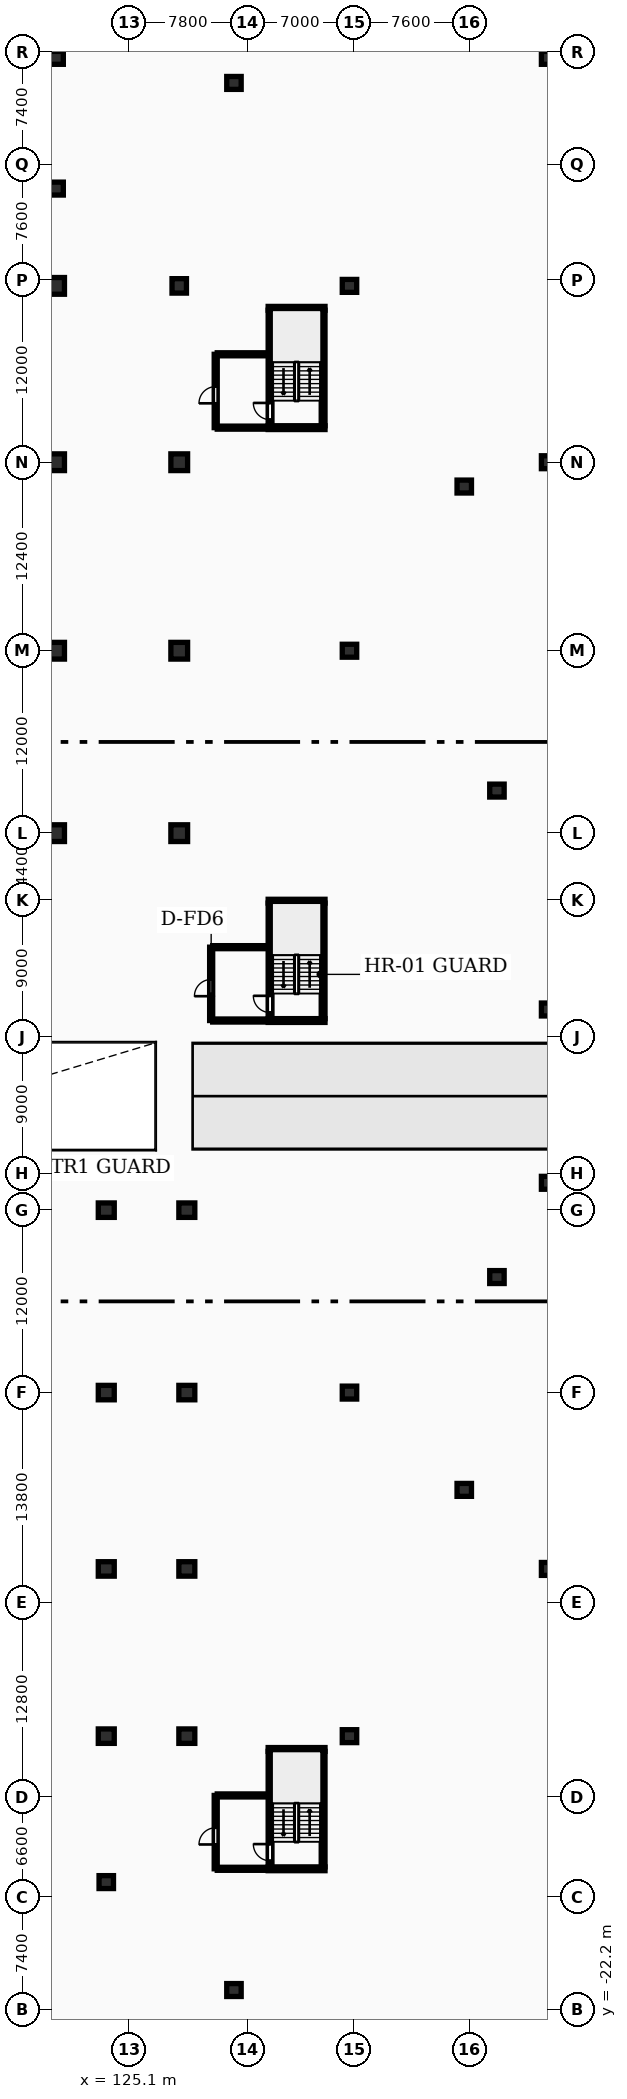
"""IFC4 building model, lengths in metres.
Left out: names, types, materials, properties, quantities, classifications, styles, units other than length and angle.
Written with IfcOpenShell. Run it as: python <this file> out.ifc"""

import sys

from ifc_helpers import new_model, si_unit, direction, frame, frame_2d, origin, origin_2d, place, context, subcontext, project, spatial, rectangle, circle, extrude, element, fill, save


model = new_model("IFC4")
c1 = context("Model", 3, precision=1e-05, world=origin(), true_north=direction((0.0, 1.0)))
c2 = subcontext(c1, "Body", "Model", "MODEL_VIEW")
j1 = project(units=[si_unit("LENGTHUNIT", "METRE"), si_unit("PLANEANGLEUNIT", "RADIAN")], contexts=[c1])
p1 = place(None, origin())
s1 = spatial("IfcSite", under=j1, at=p1, CompositionType="ELEMENT")
p2 = place(p1, origin())
s2 = spatial("IfcBuilding", under=s1, at=p2, CompositionType="ELEMENT")
p3 = place(p2, frame((0.0, 0.0, -3.6)))
s3 = spatial("IfcBuildingStorey", under=s2, at=p3, CompositionType="ELEMENT", Elevation=-3.6)
for number, where, z_axis, x_axis in (
    (1, (120.3, 55.2, 0.0), (0.0, 0.0, 1.0), (1.0, 0.0, 0.0)),
    (2, (120.3, 67.2, 0.0), (0.0, 0.0, 1.0), (1.0, 0.0, 0.0)),
    (3, (120.3, 79.6, 0.0), (0.0, 0.0, 1.0), (1.0, 0.0, 0.0)),
    (4, (120.3, 91.2, 0.0), (0.0, 0.0, 1.0), (1.0, 0.0, 0.0)),
    (5, (128.4, 55.2, 0.0), (0.0, 0.0, 1.0), (1.0, 0.0, 0.0)),
    (6, (128.4, 67.2, 0.0), (0.0, 0.0, 1.0), (1.0, 0.0, 0.0)),
    (7, (128.4, 79.6, 0.0), (0.0, 0.0, 1.0), (1.0, 0.0, 0.0)),
):
    element("IfcColumn", number, at=place(p3, frame(where, z_axis=z_axis, x_axis=x_axis)), inside=s3, PredefinedType="COLUMN", context=c2, shape_type="SweptSolid", body=[
        extrude(rectangle(XDim=1.1, YDim=1.1, at=origin_2d()), origin(), (0.0, 0.0, 1.0), 3.6),
    ])
p4 = place(p3, frame((128.4, 91.2, 0.0), z_axis=(0.0, 0.0, 1.0), x_axis=(1.0, 0.0, 0.0)))
e8 = element("IfcColumn", 8, at=p4, inside=s3, PredefinedType="COLUMN", context=c2, shape_type="SweptSolid", body=[
    extrude(circle(Radius=0.475, at=origin_2d()), origin(), (0.0, 0.0, 1.0), 3.6),
])
for number, where, z_axis, x_axis in (
    (9, (123.6, -4.2, 0.0), (0.0, 0.0, 1.0), (1.0, 0.0, 0.0)),
    (10, (123.6, 6.8, 0.0), (0.0, 0.0, 1.0), (1.0, 0.0, 0.0)),
    (11, (123.6, 18.4, 0.0), (0.0, 0.0, 1.0), (1.0, 0.0, 0.0)),
    (12, (123.6, 30.4, 0.0), (0.0, 0.0, 1.0), (1.0, 0.0, 0.0)),
    (13, (128.9, -4.2, 0.0), (0.0, 0.0, 1.0), (1.0, 0.0, 0.0)),
    (14, (128.9, 6.8, 0.0), (0.0, 0.0, 1.0), (1.0, 0.0, 0.0)),
    (15, (128.9, 18.4, 0.0), (0.0, 0.0, 1.0), (1.0, 0.0, 0.0)),
    (16, (128.9, 30.4, 0.0), (0.0, 0.0, 1.0), (1.0, 0.0, 0.0)),
):
    element("IfcColumn", number, at=place(p3, frame(where, z_axis=z_axis, x_axis=x_axis)), inside=s3, PredefinedType="COLUMN", context=c2, shape_type="SweptSolid", body=[
        extrude(rectangle(XDim=1.05, YDim=0.95, at=origin_2d()), origin(), (0.0, 0.0, 1.0), 3.6),
    ])
for number, where, z_axis, x_axis in (
    (17, (139.6, -4.2, 0.0), (0.0, 0.0, 1.0), (1.0, 0.0, 0.0)),
    (18, (139.6, 18.4, 0.0), (0.0, 0.0, 1.0), (1.0, 0.0, 0.0)),
    (19, (139.6, 67.2, 0.0), (0.0, 0.0, 1.0), (1.0, 0.0, 0.0)),
    (20, (139.6, 91.2, 0.0), (0.0, 0.0, 1.0), (1.0, 0.0, 0.0)),
    (21, (123.6, -13.8, 0.0), (0.0, 0.0, 1.0), (1.0, 0.0, 0.0)),
    (22, (120.3, 97.6, 0.0), (0.0, 0.0, 1.0), (1.0, 0.0, 0.0)),
    (23, (132.0, -20.9, 0.0), (0.0, 0.0, 1.0), (1.0, 0.0, 0.0)),
    (24, (132.0, 104.55, 0.0), (0.0, 0.0, 1.0), (1.0, 0.0, 0.0)),
    (25, (149.3, 26.0, 0.0), (0.0, 0.0, 1.0), (1.0, 0.0, 0.0)),
    (26, (149.3, 58.0, 0.0), (0.0, 0.0, 1.0), (1.0, 0.0, 0.0)),
    (27, (147.15, 12.0, 0.0), (0.0, 0.0, 1.0), (1.0, 0.0, 0.0)),
    (28, (147.15, 78.0, 0.0), (0.0, 0.0, 1.0), (1.0, 0.0, 0.0)),
    (29, (152.7, 6.8, 0.0), (0.0, 0.0, 1.0), (1.0, 0.0, 0.0)),
    (30, (152.7, 32.2, 0.0), (0.0, 0.0, 1.0), (1.0, 0.0, 0.0)),
    (31, (152.7, 43.6, 0.0), (0.0, 0.0, 1.0), (1.0, 0.0, 0.0)),
    (32, (152.7, 79.6, 0.0), (0.0, 0.0, 1.0), (1.0, 0.0, 0.0)),
    (33, (152.7, 106.2, 0.0), (0.0, 0.0, 1.0), (1.0, 0.0, 0.0)),
    (34, (120.3, 106.2, 0.0), (0.0, 0.0, 1.0), (1.0, 0.0, 0.0)),
):
    element("IfcColumn", number, at=place(p3, frame(where, z_axis=z_axis, x_axis=x_axis)), inside=s3, PredefinedType="COLUMN", context=c2, shape_type="SweptSolid", body=[
        extrude(rectangle(XDim=0.95, YDim=0.85, at=origin_2d()), origin(), (0.0, 0.0, 1.0), 3.6),
    ])
p5 = place(p3, frame((134.375, 43.0, 0.0), z_axis=(0.0, 0.0, 1.0), x_axis=(0.0, 1.0, 0.0)))
e35 = element("IfcWall", 35, at=p5, inside=s3, PredefinedType="SHEAR", context=c2, shape_type="SweptSolid", body=[
    extrude(rectangle(XDim=7.6, YDim=0.25, at=frame_2d((3.8, 0.0))), origin(), (0.0, 0.0, 1.0), 3.6),
])
p6 = place(p5, frame((0.4, 0.0, 0.0)))
e36 = element("IfcOpeningElement", 36, at=p6, cuts=e35, PredefinedType="OPENING", context=c2, shape_type="SweptSolid", body=[
    extrude(rectangle(XDim=1.1, YDim=2.1, at=frame_2d((0.55, 1.05))), frame((0.0, 0.135, 0.0), z_axis=(0.0, -1.0, 0.0), x_axis=(1.0, 0.0, 0.0)), (0.0, 0.0, 1.0), 0.27),
])
p7 = place(p3, frame((137.865, 43.0, 0.0), z_axis=(0.0, 0.0, 1.0), x_axis=(0.0, 1.0, 0.0)))
e37 = element("IfcWall", 37, at=p7, inside=s3, PredefinedType="SHEAR", context=c2, shape_type="SweptSolid", body=[
    extrude(rectangle(XDim=7.6, YDim=0.25, at=frame_2d((3.8, 0.0))), origin(), (0.0, 0.0, 1.0), 3.6),
])
for number, where, z_axis, x_axis in (
    (38, (134.25, 42.875, 0.0), (0.0, 0.0, 1.0), (1.0, 0.0, 0.0)),
    (39, (134.25, 50.725, 0.0), (0.0, 0.0, 1.0), (1.0, 0.0, 0.0)),
):
    element("IfcWall", number, at=place(p3, frame(where, z_axis=z_axis, x_axis=x_axis)), inside=s3, PredefinedType="SHEAR", context=c2, shape_type="SweptSolid", body=[
        extrude(rectangle(XDim=3.74, YDim=0.25, at=frame_2d((1.87, 0.0))), origin(), (0.0, 0.0, 1.0), 3.6),
    ])
p8 = place(p3, frame((130.5, 42.875, 0.0), z_axis=(0.0, 0.0, 1.0), x_axis=(0.0, 1.0, 0.0)))
e40 = element("IfcWall", 40, at=p8, inside=s3, PredefinedType="PARTITIONING", context=c2, shape_type="SweptSolid", body=[
    extrude(rectangle(XDim=4.825, YDim=0.2, at=frame_2d((2.413, 0.0))), origin(), (0.0, 0.0, 1.0), 3.3),
])
p9 = place(p8, frame((1.6, 0.0, 0.0)))
e41 = element("IfcOpeningElement", 41, at=p9, cuts=e40, PredefinedType="OPENING", context=c2, shape_type="SweptSolid", body=[
    extrude(rectangle(XDim=1.1, YDim=2.15, at=frame_2d((0.55, 1.075))), frame((0.0, 0.11, 0.0), z_axis=(0.0, -1.0, 0.0), x_axis=(1.0, 0.0, 0.0)), (0.0, 0.0, 1.0), 0.22),
])
for number, where, z_axis, x_axis in (
    (42, (130.6, 42.875, 0.0), (0.0, 0.0, 1.0), (1.0, 0.0, 0.0)),
    (43, (130.6, 47.7, 0.0), (0.0, 0.0, 1.0), (1.0, 0.0, 0.0)),
):
    element("IfcWall", number, at=place(p3, frame(where, z_axis=z_axis, x_axis=x_axis)), inside=s3, PredefinedType="PARTITIONING", context=c2, shape_type="SweptSolid", body=[
        extrude(rectangle(XDim=3.65, YDim=0.2, at=frame_2d((1.825, 0.0))), origin(), (0.0, 0.0, 1.0), 3.3),
    ])
p10 = place(p3, frame((134.375, 82.0, 0.0), z_axis=(0.0, 0.0, 1.0), x_axis=(0.0, 1.0, 0.0)))
e44 = element("IfcWall", 44, at=p10, inside=s3, PredefinedType="SHEAR", context=c2, shape_type="SweptSolid", body=[
    extrude(rectangle(XDim=7.6, YDim=0.25, at=frame_2d((3.8, 0.0))), origin(), (0.0, 0.0, 1.0), 3.6),
])
p11 = place(p10, frame((0.4, 0.0, 0.0)))
e45 = element("IfcOpeningElement", 45, at=p11, cuts=e44, PredefinedType="OPENING", context=c2, shape_type="SweptSolid", body=[
    extrude(rectangle(XDim=1.1, YDim=2.1, at=frame_2d((0.55, 1.05))), frame((0.0, 0.135, 0.0), z_axis=(0.0, -1.0, 0.0), x_axis=(1.0, 0.0, 0.0)), (0.0, 0.0, 1.0), 0.27),
])
p12 = place(p3, frame((137.865, 82.0, 0.0), z_axis=(0.0, 0.0, 1.0), x_axis=(0.0, 1.0, 0.0)))
e46 = element("IfcWall", 46, at=p12, inside=s3, PredefinedType="SHEAR", context=c2, shape_type="SweptSolid", body=[
    extrude(rectangle(XDim=7.6, YDim=0.25, at=frame_2d((3.8, 0.0))), origin(), (0.0, 0.0, 1.0), 3.6),
])
for number, where, z_axis, x_axis in (
    (47, (134.25, 81.875, 0.0), (0.0, 0.0, 1.0), (1.0, 0.0, 0.0)),
    (48, (134.25, 89.725, 0.0), (0.0, 0.0, 1.0), (1.0, 0.0, 0.0)),
):
    element("IfcWall", number, at=place(p3, frame(where, z_axis=z_axis, x_axis=x_axis)), inside=s3, PredefinedType="SHEAR", context=c2, shape_type="SweptSolid", body=[
        extrude(rectangle(XDim=3.74, YDim=0.25, at=frame_2d((1.87, 0.0))), origin(), (0.0, 0.0, 1.0), 3.6),
    ])
p13 = place(p3, frame((130.8, 81.875, 0.0), z_axis=(0.0, 0.0, 1.0), x_axis=(0.0, 1.0, 0.0)))
e49 = element("IfcWall", 49, at=p13, inside=s3, PredefinedType="PARTITIONING", context=c2, shape_type="SweptSolid", body=[
    extrude(rectangle(XDim=4.825, YDim=0.2, at=frame_2d((2.413, 0.0))), origin(), (0.0, 0.0, 1.0), 3.3),
])
p14 = place(p13, frame((1.6, 0.0, 0.0)))
e50 = element("IfcOpeningElement", 50, at=p14, cuts=e49, PredefinedType="OPENING", context=c2, shape_type="SweptSolid", body=[
    extrude(rectangle(XDim=1.1, YDim=2.15, at=frame_2d((0.55, 1.075))), frame((0.0, 0.11, 0.0), z_axis=(0.0, -1.0, 0.0), x_axis=(1.0, 0.0, 0.0)), (0.0, 0.0, 1.0), 0.22),
])
for number, where, z_axis, x_axis in (
    (51, (130.9, 81.875, 0.0), (0.0, 0.0, 1.0), (1.0, 0.0, 0.0)),
    (52, (130.9, 86.7, 0.0), (0.0, 0.0, 1.0), (1.0, 0.0, 0.0)),
):
    element("IfcWall", number, at=place(p3, frame(where, z_axis=z_axis, x_axis=x_axis)), inside=s3, PredefinedType="PARTITIONING", context=c2, shape_type="SweptSolid", body=[
        extrude(rectangle(XDim=3.35, YDim=0.2, at=frame_2d((1.675, 0.0))), origin(), (0.0, 0.0, 1.0), 3.3),
    ])
p15 = place(p3, frame((134.375, -12.8, 0.0), z_axis=(0.0, 0.0, 1.0), x_axis=(0.0, 1.0, 0.0)))
e53 = element("IfcWall", 53, at=p15, inside=s3, PredefinedType="SHEAR", context=c2, shape_type="SweptSolid", body=[
    extrude(rectangle(XDim=7.6, YDim=0.25, at=frame_2d((3.8, 0.0))), origin(), (0.0, 0.0, 1.0), 3.6),
])
p16 = place(p15, frame((0.4, 0.0, 0.0)))
e54 = element("IfcOpeningElement", 54, at=p16, cuts=e53, PredefinedType="OPENING", context=c2, shape_type="SweptSolid", body=[
    extrude(rectangle(XDim=1.1, YDim=2.1, at=frame_2d((0.55, 1.05))), frame((0.0, 0.135, 0.0), z_axis=(0.0, -1.0, 0.0), x_axis=(1.0, 0.0, 0.0)), (0.0, 0.0, 1.0), 0.27),
])
p17 = place(p3, frame((137.865, -12.8, 0.0), z_axis=(0.0, 0.0, 1.0), x_axis=(0.0, 1.0, 0.0)))
e55 = element("IfcWall", 55, at=p17, inside=s3, PredefinedType="SHEAR", context=c2, shape_type="SweptSolid", body=[
    extrude(rectangle(XDim=7.6, YDim=0.25, at=frame_2d((3.8, 0.0))), origin(), (0.0, 0.0, 1.0), 3.6),
])
for number, where, z_axis, x_axis in (
    (56, (134.25, -12.925, 0.0), (0.0, 0.0, 1.0), (1.0, 0.0, 0.0)),
    (57, (134.25, -5.075, 0.0), (0.0, 0.0, 1.0), (1.0, 0.0, 0.0)),
):
    element("IfcWall", number, at=place(p3, frame(where, z_axis=z_axis, x_axis=x_axis)), inside=s3, PredefinedType="SHEAR", context=c2, shape_type="SweptSolid", body=[
        extrude(rectangle(XDim=3.74, YDim=0.25, at=frame_2d((1.87, 0.0))), origin(), (0.0, 0.0, 1.0), 3.6),
    ])
p18 = place(p3, frame((130.8, -12.925, 0.0), z_axis=(0.0, 0.0, 1.0), x_axis=(0.0, 1.0, 0.0)))
e58 = element("IfcWall", 58, at=p18, inside=s3, PredefinedType="PARTITIONING", context=c2, shape_type="SweptSolid", body=[
    extrude(rectangle(XDim=4.825, YDim=0.2, at=frame_2d((2.413, 0.0))), origin(), (0.0, 0.0, 1.0), 3.3),
])
p19 = place(p18, frame((1.6, 0.0, 0.0)))
e59 = element("IfcOpeningElement", 59, at=p19, cuts=e58, PredefinedType="OPENING", context=c2, shape_type="SweptSolid", body=[
    extrude(rectangle(XDim=1.1, YDim=2.15, at=frame_2d((0.55, 1.075))), frame((0.0, 0.11, 0.0), z_axis=(0.0, -1.0, 0.0), x_axis=(1.0, 0.0, 0.0)), (0.0, 0.0, 1.0), 0.22),
])
for number, where, z_axis, x_axis in (
    (60, (130.9, -12.925, 0.0), (0.0, 0.0, 1.0), (1.0, 0.0, 0.0)),
    (61, (130.9, -8.1, 0.0), (0.0, 0.0, 1.0), (1.0, 0.0, 0.0)),
):
    element("IfcWall", number, at=place(p3, frame(where, z_axis=z_axis, x_axis=x_axis)), inside=s3, PredefinedType="PARTITIONING", context=c2, shape_type="SweptSolid", body=[
        extrude(rectangle(XDim=3.35, YDim=0.2, at=frame_2d((1.675, 0.0))), origin(), (0.0, 0.0, 1.0), 3.3),
    ])
p20 = place(p6, origin())
e62 = element("IfcDoor", 62, at=p20, inside=s3, OperationType="SINGLE_SWING_RIGHT", PredefinedType="DOOR", context=c2, shape_type="SweptSolid", body=[
    extrude(rectangle(XDim=1.1, YDim=2.1, at=frame_2d((0.55, 1.05))), frame((0.0, 0.025, 0.0), z_axis=(0.0, -1.0, 0.0), x_axis=(1.0, 0.0, 0.0)), (0.0, 0.0, 1.0), 0.05),
])
fill(e36, e62)
p21 = place(p9, origin())
e63 = element("IfcDoor", 63, at=p21, inside=s3, OperationType="SINGLE_SWING_LEFT", PredefinedType="DOOR", context=c2, shape_type="SweptSolid", body=[
    extrude(rectangle(XDim=1.1, YDim=2.15, at=frame_2d((0.55, 1.075))), frame((0.0, 0.025, 0.0), z_axis=(0.0, -1.0, 0.0), x_axis=(1.0, 0.0, 0.0)), (0.0, 0.0, 1.0), 0.05),
])
fill(e41, e63)
p22 = place(p11, origin())
e64 = element("IfcDoor", 64, at=p22, inside=s3, OperationType="SINGLE_SWING_RIGHT", PredefinedType="DOOR", context=c2, shape_type="SweptSolid", body=[
    extrude(rectangle(XDim=1.1, YDim=2.1, at=frame_2d((0.55, 1.05))), frame((0.0, 0.025, 0.0), z_axis=(0.0, -1.0, 0.0), x_axis=(1.0, 0.0, 0.0)), (0.0, 0.0, 1.0), 0.05),
])
fill(e45, e64)
p23 = place(p14, origin())
e65 = element("IfcDoor", 65, at=p23, inside=s3, OperationType="SINGLE_SWING_LEFT", PredefinedType="DOOR", context=c2, shape_type="SweptSolid", body=[
    extrude(rectangle(XDim=1.1, YDim=2.15, at=frame_2d((0.55, 1.075))), frame((0.0, 0.025, 0.0), z_axis=(0.0, -1.0, 0.0), x_axis=(1.0, 0.0, 0.0)), (0.0, 0.0, 1.0), 0.05),
])
fill(e50, e65)
p24 = place(p16, origin())
e66 = element("IfcDoor", 66, at=p24, inside=s3, OperationType="SINGLE_SWING_RIGHT", PredefinedType="DOOR", context=c2, shape_type="SweptSolid", body=[
    extrude(rectangle(XDim=1.1, YDim=2.1, at=frame_2d((0.55, 1.05))), frame((0.0, 0.025, 0.0), z_axis=(0.0, -1.0, 0.0), x_axis=(1.0, 0.0, 0.0)), (0.0, 0.0, 1.0), 0.05),
])
fill(e54, e66)
p25 = place(p19, origin())
e67 = element("IfcDoor", 67, at=p25, inside=s3, OperationType="SINGLE_SWING_LEFT", PredefinedType="DOOR", context=c2, shape_type="SweptSolid", body=[
    extrude(rectangle(XDim=1.1, YDim=2.15, at=frame_2d((0.55, 1.075))), frame((0.0, 0.025, 0.0), z_axis=(0.0, -1.0, 0.0), x_axis=(1.0, 0.0, 0.0)), (0.0, 0.0, 1.0), 0.05),
])
fill(e59, e67)
save(model, sys.argv[1])
